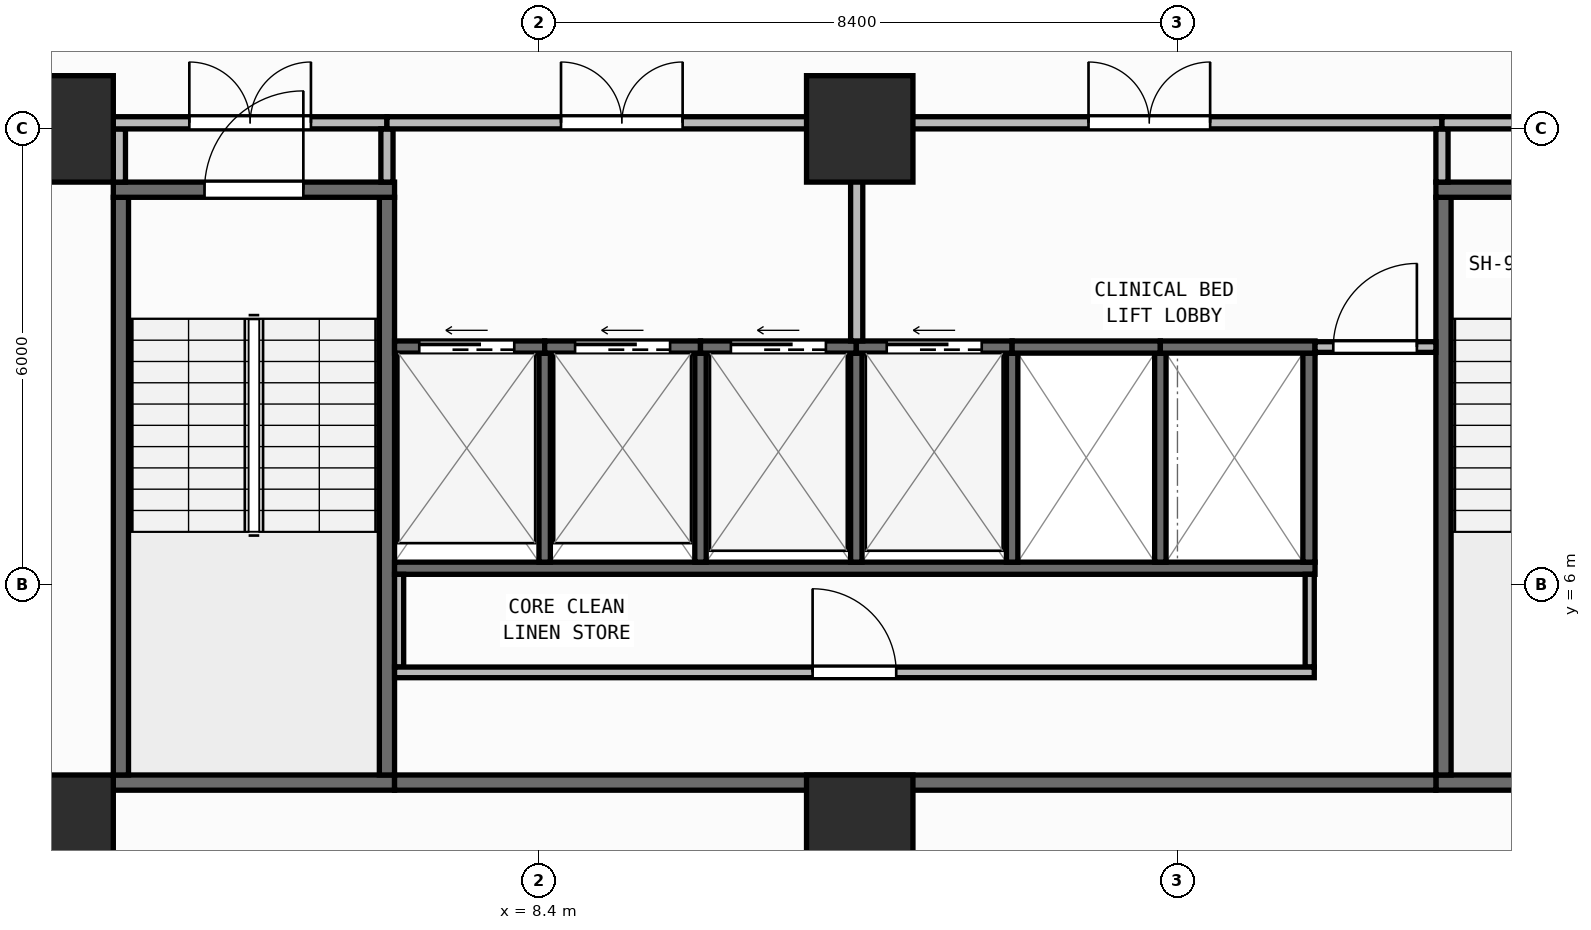
"""IFC4 building model, lengths in metres.
Left out: names, types, materials, properties, quantities, classifications, styles, units other than length and angle.
Written with IfcOpenShell. Run it as: python <this file> out.ifc"""

import sys

from ifc_helpers import new_model, si_unit, direction, frame, frame_2d, origin, origin_2d, place, context, subcontext, project, spatial, rectangle, extrude, element, fill, save


model = new_model("IFC4")
c1 = context("Model", 3, precision=1e-05, world=origin(), true_north=direction((0.0, 1.0)))
c2 = subcontext(c1, "Body", "Model", "MODEL_VIEW")
j1 = project(units=[si_unit("LENGTHUNIT", "METRE"), si_unit("PLANEANGLEUNIT", "RADIAN")], contexts=[c1])
p1 = place(None, origin())
s1 = spatial("IfcSite", under=j1, at=p1, CompositionType="ELEMENT")
p2 = place(p1, origin())
s2 = spatial("IfcBuilding", under=s1, at=p2, CompositionType="ELEMENT")
p3 = place(p2, frame((0.0, 0.0, 46.2)))
s3 = spatial("IfcBuildingStorey", under=s2, at=p3, CompositionType="ELEMENT", Elevation=46.2)
for number, where, z_axis, x_axis in (
    (1, (2.1, 2.8, 0.0), (0.0, 0.0, 1.0), (1.0, 0.0, 0.0)),
    (2, (12.62, 2.8, 0.0), (0.0, 0.0, 1.0), (1.0, 0.0, 0.0)),
    (3, (2.1, 12.0, 0.0), (0.0, 0.0, 1.0), (1.0, 0.0, 0.0)),
    (4, (12.62, 12.0, 0.0), (0.0, 0.0, 1.0), (1.0, 0.0, 0.0)),
):
    element("IfcColumn", number, at=place(p3, frame(where, z_axis=z_axis, x_axis=x_axis)), inside=s3, PredefinedType="COLUMN", context=c2, shape_type="SweptSolid", body=[
        extrude(rectangle(XDim=1.4, YDim=1.4, at=origin_2d()), origin(), (0.0, 0.0, 1.0), 3.95),
    ])
p4 = place(p3, frame((2.76, 0.174, 0.0), z_axis=(0.0, 0.0, 1.0), x_axis=(0.996571478456, 0.082736257641, 0.0)))
e5 = element("IfcWall", 5, at=p4, inside=s3, PredefinedType="STANDARD", context=c2, shape_type="SweptSolid", body=[
    extrude(rectangle(XDim=52.861, YDim=0.26, at=frame_2d((26.431, 0.0))), origin(), (0.0, 0.0, 1.0), 3.71),
])
p5 = place(p4, frame((25.231, 0.0, 0.9)))
e6 = element("IfcOpeningElement", 6, at=p5, cuts=e5, PredefinedType="OPENING", context=c2, shape_type="SweptSolid", body=[
    extrude(rectangle(XDim=2.4, YDim=1.65, at=frame_2d((1.2, 0.825))), frame((0.0, 0.14, 0.0), z_axis=(0.0, -1.0, 0.0), x_axis=(1.0, 0.0, 0.0)), (0.0, 0.0, 1.0), 0.28),
])
p6 = place(p3, frame((2.8, 3.4, 0.0), z_axis=(0.0, 0.0, 1.0), x_axis=(1.0, 0.0, 0.0)))
e7 = element("IfcWall", 7, at=p6, inside=s3, PredefinedType="SHEAR", context=c2, shape_type="SweptSolid", body=[
    extrude(rectangle(XDim=3.7, YDim=0.2, at=frame_2d((1.85, 0.0))), origin(), (0.0, 0.0, 1.0), 3.71),
])
for number, where, z_axis, x_axis in (
    (8, (2.9, 3.5, 0.0), (0.0, 0.0, 1.0), (0.0, 1.0, 0.0)),
    (9, (6.4, 3.5, 0.0), (0.0, 0.0, 1.0), (0.0, 1.0, 0.0)),
):
    element("IfcWall", number, at=place(p3, frame(where, z_axis=z_axis, x_axis=x_axis)), inside=s3, PredefinedType="SHEAR", context=c2, shape_type="SweptSolid", body=[
        extrude(rectangle(XDim=7.6, YDim=0.2, at=frame_2d((3.8, 0.0))), origin(), (0.0, 0.0, 1.0), 3.71),
    ])
p7 = place(p3, frame((2.8, 11.2, 0.0), z_axis=(0.0, 0.0, 1.0), x_axis=(1.0, 0.0, 0.0)))
e10 = element("IfcWall", 10, at=p7, inside=s3, PredefinedType="SHEAR", context=c2, shape_type="SweptSolid", body=[
    extrude(rectangle(XDim=3.7, YDim=0.2, at=frame_2d((1.85, 0.0))), origin(), (0.0, 0.0, 1.0), 3.71),
])
p8 = place(p7, frame((1.2, 0.0, 0.0)))
e11 = element("IfcOpeningElement", 11, at=p8, cuts=e10, PredefinedType="OPENING", context=c2, shape_type="SweptSolid", body=[
    extrude(rectangle(XDim=1.3, YDim=2.15, at=frame_2d((0.65, 1.075))), frame((0.0, 0.11, 0.0), z_axis=(0.0, -1.0, 0.0), x_axis=(1.0, 0.0, 0.0)), (0.0, 0.0, 1.0), 0.22),
])
p9 = place(p3, frame((20.2, 3.4, 0.0), z_axis=(0.0, 0.0, 1.0), x_axis=(1.0, 0.0, 0.0)))
e12 = element("IfcWall", 12, at=p9, inside=s3, PredefinedType="SHEAR", context=c2, shape_type="SweptSolid", body=[
    extrude(rectangle(XDim=3.7, YDim=0.2, at=frame_2d((1.85, 0.0))), origin(), (0.0, 0.0, 1.0), 3.71),
])
p10 = place(p3, frame((20.3, 3.5, 0.0), z_axis=(0.0, 0.0, 1.0), x_axis=(0.0, 1.0, 0.0)))
e13 = element("IfcWall", 13, at=p10, inside=s3, PredefinedType="SHEAR", context=c2, shape_type="SweptSolid", body=[
    extrude(rectangle(XDim=7.6, YDim=0.2, at=frame_2d((3.8, 0.0))), origin(), (0.0, 0.0, 1.0), 3.71),
])
p11 = place(p3, frame((20.2, 11.2, 0.0), z_axis=(0.0, 0.0, 1.0), x_axis=(1.0, 0.0, 0.0)))
e14 = element("IfcWall", 14, at=p11, inside=s3, PredefinedType="SHEAR", context=c2, shape_type="SweptSolid", body=[
    extrude(rectangle(XDim=3.7, YDim=0.2, at=frame_2d((1.85, 0.0))), origin(), (0.0, 0.0, 1.0), 3.71),
])
p12 = place(p11, frame((1.2, 0.0, 0.0)))
e15 = element("IfcOpeningElement", 15, at=p12, cuts=e14, PredefinedType="OPENING", context=c2, shape_type="SweptSolid", body=[
    extrude(rectangle(XDim=1.3, YDim=2.15, at=frame_2d((0.65, 1.075))), frame((0.0, 0.11, 0.0), z_axis=(0.0, -1.0, 0.0), x_axis=(1.0, 0.0, 0.0)), (0.0, 0.0, 1.0), 0.22),
])
p13 = place(p3, frame((6.5, 3.4, 0.0), z_axis=(0.0, 0.0, 1.0), x_axis=(1.0, 0.0, 0.0)))
e16 = element("IfcWall", 16, at=p13, inside=s3, PredefinedType="SHEAR", context=c2, shape_type="SweptSolid", body=[
    extrude(rectangle(XDim=13.7, YDim=0.2, at=frame_2d((6.85, 0.0))), origin(), (0.0, 0.0, 1.0), 3.71),
])
p14 = place(p3, frame((6.5, 6.22, 0.0), z_axis=(0.0, 0.0, 1.0), x_axis=(1.0, 0.0, 0.0)))
e17 = element("IfcWall", 17, at=p14, inside=s3, PredefinedType="SHEAR", context=c2, shape_type="SweptSolid", body=[
    extrude(rectangle(XDim=12.11, YDim=0.16, at=frame_2d((6.055, 0.0))), origin(), (0.0, 0.0, 1.0), 3.71),
])
p15 = place(p3, frame((18.53, 6.3, 0.0), z_axis=(0.0, 0.0, 1.0), x_axis=(0.0, 1.0, 0.0)))
e18 = element("IfcWall", 18, at=p15, inside=s3, PredefinedType="SHEAR", context=c2, shape_type="SweptSolid", body=[
    extrude(rectangle(XDim=2.75, YDim=0.16, at=frame_2d((1.375, 0.0))), origin(), (0.0, 0.0, 1.0), 3.71),
])
for number, where, z_axis, x_axis in (
    (19, (8.475, 6.3, 0.0), (0.0, 0.0, 1.0), (0.0, 1.0, 0.0)),
    (20, (10.525, 6.3, 0.0), (0.0, 0.0, 1.0), (0.0, 1.0, 0.0)),
    (21, (12.575, 6.3, 0.0), (0.0, 0.0, 1.0), (0.0, 1.0, 0.0)),
    (22, (14.625, 6.3, 0.0), (0.0, 0.0, 1.0), (0.0, 1.0, 0.0)),
    (23, (16.575, 6.3, 0.0), (0.0, 0.0, 1.0), (0.0, 1.0, 0.0)),
):
    element("IfcWall", number, at=place(p3, frame(where, z_axis=z_axis, x_axis=x_axis)), inside=s3, PredefinedType="SHEAR", context=c2, shape_type="SweptSolid", body=[
        extrude(rectangle(XDim=2.75, YDim=0.15, at=frame_2d((1.375, 0.0))), origin(), (0.0, 0.0, 1.0), 3.71),
    ])
p16 = place(p3, frame((6.5, 9.13, 0.0), z_axis=(0.0, 0.0, 1.0), x_axis=(1.0, 0.0, 0.0)))
e24 = element("IfcWall", 24, at=p16, inside=s3, PredefinedType="SHEAR", context=c2, shape_type="SweptSolid", body=[
    extrude(rectangle(XDim=1.975, YDim=0.16, at=frame_2d((0.988, 0.0))), origin(), (0.0, 0.0, 1.0), 3.71),
])
p17 = place(p16, frame((0.325, 0.0, 0.0)))
e25 = element("IfcOpeningElement", 25, at=p17, cuts=e24, PredefinedType="OPENING", context=c2, shape_type="SweptSolid", body=[
    extrude(rectangle(XDim=1.25, YDim=2.15, at=frame_2d((0.625, 1.075))), frame((0.0, 0.09, 0.0), z_axis=(0.0, -1.0, 0.0), x_axis=(1.0, 0.0, 0.0)), (0.0, 0.0, 1.0), 0.18),
])
p18 = place(p3, frame((8.475, 9.13, 0.0), z_axis=(0.0, 0.0, 1.0), x_axis=(1.0, 0.0, 0.0)))
e26 = element("IfcWall", 26, at=p18, inside=s3, PredefinedType="SHEAR", context=c2, shape_type="SweptSolid", body=[
    extrude(rectangle(XDim=2.05, YDim=0.16, at=frame_2d((1.025, 0.0))), origin(), (0.0, 0.0, 1.0), 3.71),
])
p19 = place(p18, frame((0.4, 0.0, 0.0)))
e27 = element("IfcOpeningElement", 27, at=p19, cuts=e26, PredefinedType="OPENING", context=c2, shape_type="SweptSolid", body=[
    extrude(rectangle(XDim=1.25, YDim=2.15, at=frame_2d((0.625, 1.075))), frame((0.0, 0.09, 0.0), z_axis=(0.0, -1.0, 0.0), x_axis=(1.0, 0.0, 0.0)), (0.0, 0.0, 1.0), 0.18),
])
p20 = place(p3, frame((10.525, 9.13, 0.0), z_axis=(0.0, 0.0, 1.0), x_axis=(1.0, 0.0, 0.0)))
e28 = element("IfcWall", 28, at=p20, inside=s3, PredefinedType="SHEAR", context=c2, shape_type="SweptSolid", body=[
    extrude(rectangle(XDim=2.05, YDim=0.16, at=frame_2d((1.025, 0.0))), origin(), (0.0, 0.0, 1.0), 3.71),
])
p21 = place(p20, frame((0.4, 0.0, 0.0)))
e29 = element("IfcOpeningElement", 29, at=p21, cuts=e28, PredefinedType="OPENING", context=c2, shape_type="SweptSolid", body=[
    extrude(rectangle(XDim=1.25, YDim=2.15, at=frame_2d((0.625, 1.075))), frame((0.0, 0.09, 0.0), z_axis=(0.0, -1.0, 0.0), x_axis=(1.0, 0.0, 0.0)), (0.0, 0.0, 1.0), 0.18),
])
p22 = place(p3, frame((12.575, 9.13, 0.0), z_axis=(0.0, 0.0, 1.0), x_axis=(1.0, 0.0, 0.0)))
e30 = element("IfcWall", 30, at=p22, inside=s3, PredefinedType="SHEAR", context=c2, shape_type="SweptSolid", body=[
    extrude(rectangle(XDim=2.05, YDim=0.16, at=frame_2d((1.025, 0.0))), origin(), (0.0, 0.0, 1.0), 3.71),
])
p23 = place(p22, frame((0.4, 0.0, 0.0)))
e31 = element("IfcOpeningElement", 31, at=p23, cuts=e30, PredefinedType="OPENING", context=c2, shape_type="SweptSolid", body=[
    extrude(rectangle(XDim=1.25, YDim=2.15, at=frame_2d((0.625, 1.075))), frame((0.0, 0.09, 0.0), z_axis=(0.0, -1.0, 0.0), x_axis=(1.0, 0.0, 0.0)), (0.0, 0.0, 1.0), 0.18),
])
p24 = place(p3, frame((14.625, 9.13, 0.0), z_axis=(0.0, 0.0, 1.0), x_axis=(1.0, 0.0, 0.0)))
e32 = element("IfcWall", 32, at=p24, inside=s3, PredefinedType="SHEAR", context=c2, shape_type="SweptSolid", body=[
    extrude(rectangle(XDim=1.95, YDim=0.16, at=frame_2d((0.975, 0.0))), origin(), (0.0, 0.0, 1.0), 3.71),
])
p25 = place(p3, frame((16.575, 9.13, 0.0), z_axis=(0.0, 0.0, 1.0), x_axis=(1.0, 0.0, 0.0)))
e33 = element("IfcWall", 33, at=p25, inside=s3, PredefinedType="SHEAR", context=c2, shape_type="SweptSolid", body=[
    extrude(rectangle(XDim=2.035, YDim=0.16, at=frame_2d((1.018, 0.0))), origin(), (0.0, 0.0, 1.0), 3.71),
])
for number, where, z_axis, x_axis in (
    (34, (6.56, 4.92, 0.0), (0.0, 0.0, 1.0), (0.0, 1.0, 0.0)),
    (35, (18.54, 4.92, 0.0), (0.0, 0.0, 1.0), (0.0, 1.0, 0.0)),
):
    element("IfcWall", number, at=place(p3, frame(where, z_axis=z_axis, x_axis=x_axis)), inside=s3, PredefinedType="PARTITIONING", context=c2, shape_type="SweptSolid", body=[
        extrude(rectangle(XDim=1.22, YDim=0.12, at=frame_2d((0.61, 0.0))), origin(), (0.0, 0.0, 1.0), 3.71),
    ])
p26 = place(p3, frame((6.5, 4.85, 0.0), z_axis=(0.0, 0.0, 1.0), x_axis=(1.0, 0.0, 0.0)))
e36 = element("IfcWall", 36, at=p26, inside=s3, PredefinedType="PARTITIONING", context=c2, shape_type="SweptSolid", body=[
    extrude(rectangle(XDim=12.1, YDim=0.14, at=frame_2d((6.05, 0.0))), origin(), (0.0, 0.0, 1.0), 3.71),
])
p27 = place(p26, frame((5.5, 0.0, 0.0)))
e37 = element("IfcOpeningElement", 37, at=p27, cuts=e36, PredefinedType="OPENING", context=c2, shape_type="SweptSolid", body=[
    extrude(rectangle(XDim=1.1, YDim=2.1, at=frame_2d((0.55, 1.05))), frame((0.0, 0.08, 0.0), z_axis=(0.0, -1.0, 0.0), x_axis=(1.0, 0.0, 0.0)), (0.0, 0.0, 1.0), 0.16),
])
p28 = place(p3, frame((18.61, 9.13, 0.0), z_axis=(0.0, 0.0, 1.0), x_axis=(1.0, 0.0, 0.0)))
e38 = element("IfcWall", 38, at=p28, inside=s3, PredefinedType="PARTITIONING", context=c2, shape_type="SweptSolid", body=[
    extrude(rectangle(XDim=1.59, YDim=0.14, at=frame_2d((0.795, 0.0))), origin(), (0.0, 0.0, 1.0), 3.71),
])
p29 = place(p28, frame((0.24, 0.0, 0.0)))
e39 = element("IfcOpeningElement", 39, at=p29, cuts=e38, PredefinedType="OPENING", context=c2, shape_type="SweptSolid", body=[
    extrude(rectangle(XDim=1.1, YDim=2.1, at=frame_2d((0.55, 1.05))), frame((0.0, 0.08, 0.0), z_axis=(0.0, -1.0, 0.0), x_axis=(1.0, 0.0, 0.0)), (0.0, 0.0, 1.0), 0.16),
])
p30 = place(p3, frame((2.88, 11.3, 0.0), z_axis=(0.0, 0.0, 1.0), x_axis=(0.0, 1.0, 0.0)))
e40 = element("IfcWall", 40, at=p30, inside=s3, PredefinedType="PARTITIONING", context=c2, shape_type="SweptSolid", body=[
    extrude(rectangle(XDim=0.7, YDim=0.16, at=frame_2d((0.35, 0.0))), origin(), (0.0, 0.0, 1.0), 3.71),
])
p31 = place(p3, frame((2.8, 12.08, 0.0), z_axis=(0.0, 0.0, 1.0), x_axis=(1.0, 0.0, 0.0)))
e41 = element("IfcWall", 41, at=p31, inside=s3, PredefinedType="PARTITIONING", context=c2, shape_type="SweptSolid", body=[
    extrude(rectangle(XDim=3.6, YDim=0.16, at=frame_2d((1.8, 0.0))), origin(), (0.0, 0.0, 1.0), 3.073),
])
p32 = place(p31, frame((1.0, 0.0, 0.0)))
e42 = element("IfcOpeningElement", 42, at=p32, cuts=e41, PredefinedType="OPENING", context=c2, shape_type="SweptSolid", body=[
    extrude(rectangle(XDim=1.6, YDim=2.05, at=frame_2d((0.8, 1.025))), frame((0.0, 0.09, 0.0), z_axis=(0.0, -1.0, 0.0), x_axis=(1.0, 0.0, 0.0)), (0.0, 0.0, 1.0), 0.18),
])
p33 = place(p3, frame((6.4, 11.3, 0.0), z_axis=(0.0, 0.0, 1.0), x_axis=(0.0, 1.0, 0.0)))
e43 = element("IfcWall", 43, at=p33, inside=s3, PredefinedType="PARTITIONING", context=c2, shape_type="SweptSolid", body=[
    extrude(rectangle(XDim=0.7, YDim=0.16, at=frame_2d((0.35, 0.0))), origin(), (0.0, 0.0, 1.0), 3.71),
])
p34 = place(p3, frame((6.4, 12.08, 0.0), z_axis=(0.0, 0.0, 1.0), x_axis=(1.0, 0.0, 0.0)))
e44 = element("IfcWall", 44, at=p34, inside=s3, PredefinedType="PARTITIONING", context=c2, shape_type="SweptSolid", body=[
    extrude(rectangle(XDim=6.18, YDim=0.16, at=frame_2d((3.09, 0.0))), origin(), (0.0, 0.0, 1.0), 3.073),
])
p35 = place(p34, frame((2.29, 0.0, 0.0)))
e45 = element("IfcOpeningElement", 45, at=p35, cuts=e44, PredefinedType="OPENING", context=c2, shape_type="SweptSolid", body=[
    extrude(rectangle(XDim=1.6, YDim=2.05, at=frame_2d((0.8, 1.025))), frame((0.0, 0.09, 0.0), z_axis=(0.0, -1.0, 0.0), x_axis=(1.0, 0.0, 0.0)), (0.0, 0.0, 1.0), 0.18),
])
p36 = place(p3, frame((12.58, 9.21, 0.0), z_axis=(0.0, 0.0, 1.0), x_axis=(0.0, 1.0, 0.0)))
e46 = element("IfcWall", 46, at=p36, inside=s3, PredefinedType="PARTITIONING", context=c2, shape_type="SweptSolid", body=[
    extrude(rectangle(XDim=2.79, YDim=0.16, at=frame_2d((1.395, 0.0))), origin(), (0.0, 0.0, 1.0), 3.71),
])
p37 = place(p3, frame((12.58, 12.08, 0.0), z_axis=(0.0, 0.0, 1.0), x_axis=(1.0, 0.0, 0.0)))
e47 = element("IfcWall", 47, at=p37, inside=s3, PredefinedType="PARTITIONING", context=c2, shape_type="SweptSolid", body=[
    extrude(rectangle(XDim=7.7, YDim=0.16, at=frame_2d((3.85, 0.0))), origin(), (0.0, 0.0, 1.0), 3.073),
])
p38 = place(p37, frame((3.05, 0.0, 0.0)))
e48 = element("IfcOpeningElement", 48, at=p38, cuts=e47, PredefinedType="OPENING", context=c2, shape_type="SweptSolid", body=[
    extrude(rectangle(XDim=1.6, YDim=2.05, at=frame_2d((0.8, 1.025))), frame((0.0, 0.09, 0.0), z_axis=(0.0, -1.0, 0.0), x_axis=(1.0, 0.0, 0.0)), (0.0, 0.0, 1.0), 0.18),
])
p39 = place(p3, frame((20.28, 11.3, 0.0), z_axis=(0.0, 0.0, 1.0), x_axis=(0.0, 1.0, 0.0)))
e49 = element("IfcWall", 49, at=p39, inside=s3, PredefinedType="PARTITIONING", context=c2, shape_type="SweptSolid", body=[
    extrude(rectangle(XDim=0.7, YDim=0.16, at=frame_2d((0.35, 0.0))), origin(), (0.0, 0.0, 1.0), 3.71),
])
p40 = place(p3, frame((20.28, 12.08, 0.0), z_axis=(0.0, 0.0, 1.0), x_axis=(1.0, 0.0, 0.0)))
e50 = element("IfcWall", 50, at=p40, inside=s3, PredefinedType="PARTITIONING", context=c2, shape_type="SweptSolid", body=[
    extrude(rectangle(XDim=3.62, YDim=0.16, at=frame_2d((1.81, 0.0))), origin(), (0.0, 0.0, 1.0), 3.073),
])
p41 = place(p40, frame((1.01, 0.0, 0.0)))
e51 = element("IfcOpeningElement", 51, at=p41, cuts=e50, PredefinedType="OPENING", context=c2, shape_type="SweptSolid", body=[
    extrude(rectangle(XDim=1.6, YDim=2.05, at=frame_2d((0.8, 1.025))), frame((0.0, 0.09, 0.0), z_axis=(0.0, -1.0, 0.0), x_axis=(1.0, 0.0, 0.0)), (0.0, 0.0, 1.0), 0.18),
])
p42 = place(p8, origin())
e52 = element("IfcDoor", 52, at=p42, inside=s3, OperationType="SINGLE_SWING_RIGHT", PredefinedType="DOOR", context=c2, shape_type="SweptSolid", body=[
    extrude(rectangle(XDim=1.3, YDim=2.15, at=frame_2d((0.65, 1.075))), frame((0.0, 0.025, 0.0), z_axis=(0.0, -1.0, 0.0), x_axis=(1.0, 0.0, 0.0)), (0.0, 0.0, 1.0), 0.05),
])
fill(e11, e52)
p43 = place(p17, origin())
e53 = element("IfcDoor", 53, at=p43, inside=s3, OperationType="SLIDING_TO_LEFT", PredefinedType="DOOR", context=c2, shape_type="SweptSolid", body=[
    extrude(rectangle(XDim=1.25, YDim=2.15, at=frame_2d((0.625, 1.075))), frame((0.0, 0.025, 0.0), z_axis=(0.0, -1.0, 0.0), x_axis=(1.0, 0.0, 0.0)), (0.0, 0.0, 1.0), 0.05),
])
fill(e25, e53)
p44 = place(p19, origin())
e54 = element("IfcDoor", 54, at=p44, inside=s3, OperationType="SLIDING_TO_LEFT", PredefinedType="DOOR", context=c2, shape_type="SweptSolid", body=[
    extrude(rectangle(XDim=1.25, YDim=2.15, at=frame_2d((0.625, 1.075))), frame((0.0, 0.025, 0.0), z_axis=(0.0, -1.0, 0.0), x_axis=(1.0, 0.0, 0.0)), (0.0, 0.0, 1.0), 0.05),
])
fill(e27, e54)
p45 = place(p21, origin())
e55 = element("IfcDoor", 55, at=p45, inside=s3, OperationType="SLIDING_TO_LEFT", PredefinedType="DOOR", context=c2, shape_type="SweptSolid", body=[
    extrude(rectangle(XDim=1.25, YDim=2.15, at=frame_2d((0.625, 1.075))), frame((0.0, 0.025, 0.0), z_axis=(0.0, -1.0, 0.0), x_axis=(1.0, 0.0, 0.0)), (0.0, 0.0, 1.0), 0.05),
])
fill(e29, e55)
p46 = place(p23, origin())
e56 = element("IfcDoor", 56, at=p46, inside=s3, OperationType="SLIDING_TO_LEFT", PredefinedType="DOOR", context=c2, shape_type="SweptSolid", body=[
    extrude(rectangle(XDim=1.25, YDim=2.15, at=frame_2d((0.625, 1.075))), frame((0.0, 0.025, 0.0), z_axis=(0.0, -1.0, 0.0), x_axis=(1.0, 0.0, 0.0)), (0.0, 0.0, 1.0), 0.05),
])
fill(e31, e56)
p47 = place(p27, origin())
e57 = element("IfcDoor", 57, at=p47, inside=s3, OperationType="SINGLE_SWING_LEFT", PredefinedType="DOOR", context=c2, shape_type="SweptSolid", body=[
    extrude(rectangle(XDim=1.1, YDim=2.1, at=frame_2d((0.55, 1.05))), frame((0.0, 0.025, 0.0), z_axis=(0.0, -1.0, 0.0), x_axis=(1.0, 0.0, 0.0)), (0.0, 0.0, 1.0), 0.05),
])
fill(e37, e57)
p48 = place(p29, origin())
e58 = element("IfcDoor", 58, at=p48, inside=s3, OperationType="SINGLE_SWING_RIGHT", PredefinedType="DOOR", context=c2, shape_type="SweptSolid", body=[
    extrude(rectangle(XDim=1.1, YDim=2.1, at=frame_2d((0.55, 1.05))), frame((0.0, 0.025, 0.0), z_axis=(0.0, -1.0, 0.0), x_axis=(1.0, 0.0, 0.0)), (0.0, 0.0, 1.0), 0.05),
])
fill(e39, e58)
p49 = place(p32, origin())
e59 = element("IfcDoor", 59, at=p49, inside=s3, OperationType="DOUBLE_DOOR_SINGLE_SWING", PredefinedType="DOOR", context=c2, shape_type="SweptSolid", body=[
    extrude(rectangle(XDim=1.6, YDim=2.05, at=frame_2d((0.8, 1.025))), frame((0.0, 0.025, 0.0), z_axis=(0.0, -1.0, 0.0), x_axis=(1.0, 0.0, 0.0)), (0.0, 0.0, 1.0), 0.05),
])
fill(e42, e59)
p50 = place(p35, origin())
e60 = element("IfcDoor", 60, at=p50, inside=s3, OperationType="DOUBLE_DOOR_SINGLE_SWING", PredefinedType="DOOR", context=c2, shape_type="SweptSolid", body=[
    extrude(rectangle(XDim=1.6, YDim=2.05, at=frame_2d((0.8, 1.025))), frame((0.0, 0.025, 0.0), z_axis=(0.0, -1.0, 0.0), x_axis=(1.0, 0.0, 0.0)), (0.0, 0.0, 1.0), 0.05),
])
fill(e45, e60)
p51 = place(p38, origin())
e61 = element("IfcDoor", 61, at=p51, inside=s3, OperationType="DOUBLE_DOOR_SINGLE_SWING", PredefinedType="DOOR", context=c2, shape_type="SweptSolid", body=[
    extrude(rectangle(XDim=1.6, YDim=2.05, at=frame_2d((0.8, 1.025))), frame((0.0, 0.025, 0.0), z_axis=(0.0, -1.0, 0.0), x_axis=(1.0, 0.0, 0.0)), (0.0, 0.0, 1.0), 0.05),
])
fill(e48, e61)
save(model, sys.argv[1])
